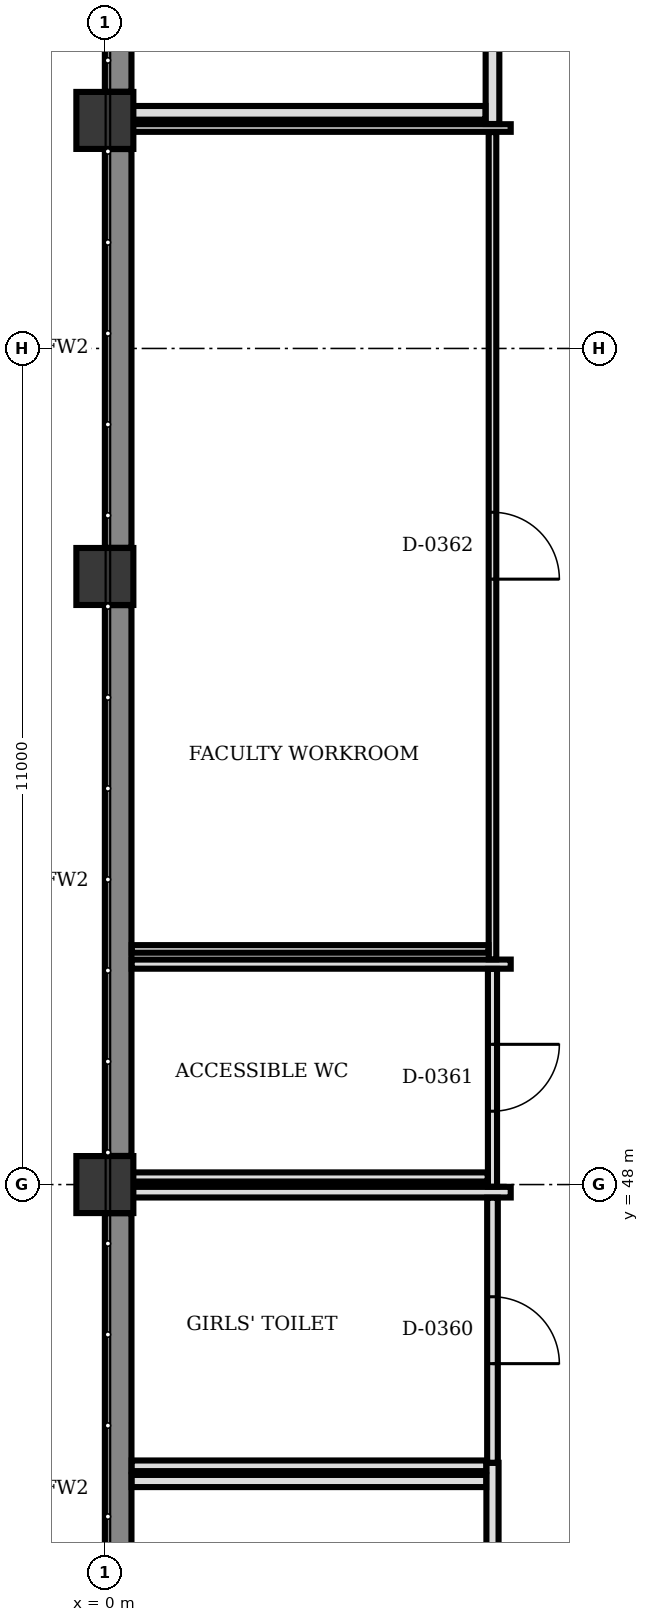
"""IFC4 building model, lengths in metres.
Left out: names, types, materials, properties, quantities, classifications, styles, units other than length and angle.
Written with IfcOpenShell. Run it as: python <this file> out.ifc"""

import sys

from ifc_helpers import new_model, si_unit, direction, frame, frame_2d, origin, origin_2d, place, context, subcontext, project, spatial, rectangle, extrude, element, fill, save


model = new_model("IFC4")
c1 = context("Model", 3, precision=1e-05, world=origin(), true_north=direction((0.0, 1.0)))
c2 = subcontext(c1, "Body", "Model", "MODEL_VIEW")
j1 = project(units=[si_unit("LENGTHUNIT", "METRE"), si_unit("PLANEANGLEUNIT", "RADIAN")], contexts=[c1])
p1 = place(None, origin())
s1 = spatial("IfcSite", under=j1, at=p1, CompositionType="ELEMENT")
p2 = place(p1, origin())
s2 = spatial("IfcBuilding", under=s1, at=p2, CompositionType="ELEMENT")
p3 = place(p2, frame((0.0, 0.0, 4.5)))
s3 = spatial("IfcBuildingStorey", under=s2, at=p3, CompositionType="ELEMENT", Elevation=4.5)
for number, where, z_axis, x_axis in (
    (1, (0.0, 48.0, 0.0), (0.0, 0.0, 1.0), (1.0, 0.0, 0.0)),
    (2, (0.0, 56.0, 0.0), (0.0, 0.0, 1.0), (1.0, 0.0, 0.0)),
    (3, (0.0, 62.0, 0.0), (0.0, 0.0, 1.0), (1.0, 0.0, 0.0)),
):
    element("IfcColumn", number, at=place(p3, frame(where, z_axis=z_axis, x_axis=x_axis)), inside=s3, PredefinedType="COLUMN", context=c2, shape_type="SweptSolid", body=[
        extrude(rectangle(XDim=0.75, YDim=0.75, at=origin_2d()), origin(), (0.0, 0.0, 1.0), 4.0),
    ])
for number, where, z_axis, x_axis in (
    (4, (0.175, 40.377, 0.0), (0.0, 0.0, 1.0), (0.0, 1.0, 0.0)),
    (5, (0.175, 48.377, 0.0), (0.0, 0.0, 1.0), (0.0, 1.0, 0.0)),
):
    element("IfcWall", number, at=place(p3, frame(where, z_axis=z_axis, x_axis=x_axis)), inside=s3, PredefinedType="SHEAR", context=c2, shape_type="SweptSolid", body=[
        extrude(rectangle(XDim=7.246, YDim=0.35, at=frame_2d((3.623, 0.0))), origin(), (0.0, 0.0, 1.0), 3.7),
    ])
for number, where, z_axis, x_axis in (
    (6, (0.175, 56.377, 0.0), (0.0, 0.0, 1.0), (0.0, 1.0, 0.0)),
    (7, (0.175, 62.377, 0.0), (0.0, 0.0, 1.0), (0.0, 1.0, 0.0)),
):
    element("IfcWall", number, at=place(p3, frame(where, z_axis=z_axis, x_axis=x_axis)), inside=s3, PredefinedType="SHEAR", context=c2, shape_type="SweptSolid", body=[
        extrude(rectangle(XDim=5.246, YDim=0.35, at=frame_2d((2.623, 0.0))), origin(), (0.0, 0.0, 1.0), 3.7),
    ])
p4 = place(p3, frame((5.1, 44.34, 0.0), z_axis=(0.0, 0.0, 1.0), x_axis=(0.0, -1.0, 0.0)))
e8 = element("IfcWall", 8, at=p4, inside=s3, PredefinedType="PARTITIONING", context=c2, shape_type="SweptSolid", body=[
    extrude(rectangle(XDim=4.207, YDim=0.16, at=frame_2d((2.104, 0.0))), origin(), (0.0, 0.0, 1.0), 3.7),
])
p5 = place(p4, frame((1.354, 0.0, 0.0)))
e9 = element("IfcOpeningElement", 9, at=p5, cuts=e8, PredefinedType="OPENING", context=c2, shape_type="SweptSolid", body=[
    extrude(rectangle(XDim=1.5, YDim=2.28, at=frame_2d((0.75, 1.14))), frame((0.0, 0.09, 0.0), z_axis=(0.0, -1.0, 0.0), x_axis=(1.0, 0.0, 0.0)), (0.0, 0.0, 1.0), 0.18),
])
p6 = place(p3, frame((0.353, 44.1, 0.0), z_axis=(0.0, 0.0, 1.0), x_axis=(1.0, 0.0, 0.0)))
e10 = element("IfcWall", 10, at=p6, inside=s3, PredefinedType="PARTITIONING", context=c2, shape_type="SweptSolid", body=[
    extrude(rectangle(XDim=4.664, YDim=0.16, at=frame_2d((2.332, 0.0))), origin(), (0.0, 0.0, 1.0), 3.7),
])
p7 = place(p3, frame((0.367, 47.9, 0.0), z_axis=(0.0, 0.0, 1.0), x_axis=(1.0, 0.0, 0.0)))
e11 = element("IfcWall", 11, at=p7, inside=s3, PredefinedType="PARTITIONING", context=c2, shape_type="SweptSolid", body=[
    extrude(rectangle(XDim=4.973, YDim=0.14, at=frame_2d((2.487, 0.0))), origin(), (0.0, 0.0, 1.0), 2.982),
])
p8 = place(p3, frame((5.1, 47.827, 0.0), z_axis=(0.0, 0.0, 1.0), x_axis=(0.0, -1.0, 0.0)))
e12 = element("IfcWall", 12, at=p8, inside=s3, PredefinedType="PARTITIONING", context=c2, shape_type="SweptSolid", body=[
    extrude(rectangle(XDim=3.487, YDim=0.14, at=frame_2d((1.743, 0.0))), origin(), (0.0, 0.0, 1.0), 2.982),
])
p9 = place(p8, frame((1.303, 0.0, 0.0)))
e13 = element("IfcOpeningElement", 13, at=p9, cuts=e12, PredefinedType="OPENING", context=c2, shape_type="SweptSolid", body=[
    extrude(rectangle(XDim=0.88, YDim=2.1, at=frame_2d((0.44, 1.05))), frame((0.0, 0.08, 0.0), z_axis=(0.0, -1.0, 0.0), x_axis=(1.0, 0.0, 0.0)), (0.0, 0.0, 1.0), 0.16),
])
p10 = place(p3, frame((5.017, 44.3, 0.0), z_axis=(0.0, 0.0, 1.0), x_axis=(-1.0, 0.0, 0.0)))
e14 = element("IfcWall", 14, at=p10, inside=s3, PredefinedType="PARTITIONING", context=c2, shape_type="SweptSolid", body=[
    extrude(rectangle(XDim=4.664, YDim=0.14, at=frame_2d((2.332, 0.0))), origin(), (0.0, 0.0, 1.0), 3.7),
])
p11 = place(p3, frame((0.353, 50.9, 0.0), z_axis=(0.0, 0.0, 1.0), x_axis=(1.0, 0.0, 0.0)))
e15 = element("IfcWall", 15, at=p11, inside=s3, PredefinedType="PARTITIONING", context=c2, shape_type="SweptSolid", body=[
    extrude(rectangle(XDim=4.987, YDim=0.12, at=frame_2d((2.494, 0.0))), origin(), (0.0, 0.0, 1.0), 3.7),
])
p12 = place(p3, frame((5.1, 50.837, 0.0), z_axis=(0.0, 0.0, 1.0), x_axis=(0.0, -1.0, 0.0)))
e16 = element("IfcWall", 16, at=p12, inside=s3, PredefinedType="PARTITIONING", context=c2, shape_type="SweptSolid", body=[
    extrude(rectangle(XDim=2.864, YDim=0.12, at=frame_2d((1.432, 0.0))), origin(), (0.0, 0.0, 1.0), 2.982),
])
p13 = place(p12, frame((0.992, 0.0, 0.0)))
e17 = element("IfcOpeningElement", 17, at=p13, cuts=e16, PredefinedType="OPENING", context=c2, shape_type="SweptSolid", body=[
    extrude(rectangle(XDim=0.88, YDim=2.1, at=frame_2d((0.44, 1.05))), frame((0.0, 0.07, 0.0), z_axis=(0.0, -1.0, 0.0), x_axis=(1.0, 0.0, 0.0)), (0.0, 0.0, 1.0), 0.14),
])
p14 = place(p3, frame((5.037, 48.1, 0.0), z_axis=(0.0, 0.0, 1.0), x_axis=(-1.0, 0.0, 0.0)))
e18 = element("IfcWall", 18, at=p14, inside=s3, PredefinedType="PARTITIONING", context=c2, shape_type="SweptSolid", body=[
    extrude(rectangle(XDim=4.67, YDim=0.12, at=frame_2d((2.335, 0.0))), origin(), (0.0, 0.0, 1.0), 2.982),
])
p15 = place(p3, frame((0.367, 61.9, 0.0), z_axis=(0.0, 0.0, 1.0), x_axis=(1.0, 0.0, 0.0)))
e19 = element("IfcWall", 19, at=p15, inside=s3, PredefinedType="PARTITIONING", context=c2, shape_type="SweptSolid", body=[
    extrude(rectangle(XDim=4.973, YDim=0.1, at=frame_2d((2.487, 0.0))), origin(), (0.0, 0.0, 1.0), 2.982),
])
p16 = place(p3, frame((5.1, 61.847, 0.0), z_axis=(0.0, 0.0, 1.0), x_axis=(0.0, -1.0, 0.0)))
e20 = element("IfcWall", 20, at=p16, inside=s3, PredefinedType="PARTITIONING", context=c2, shape_type="SweptSolid", body=[
    extrude(rectangle(XDim=10.884, YDim=0.1, at=frame_2d((5.442, 0.0))), origin(), (0.0, 0.0, 1.0), 2.982),
])
p17 = place(p16, frame((5.002, 0.0, 0.0)))
e21 = element("IfcOpeningElement", 21, at=p17, cuts=e20, PredefinedType="OPENING", context=c2, shape_type="SweptSolid", body=[
    extrude(rectangle(XDim=0.88, YDim=2.1, at=frame_2d((0.44, 1.05))), frame((0.0, 0.06, 0.0), z_axis=(0.0, -1.0, 0.0), x_axis=(1.0, 0.0, 0.0)), (0.0, 0.0, 1.0), 0.12),
])
p18 = place(p3, frame((5.047, 51.1, 0.0), z_axis=(0.0, 0.0, 1.0), x_axis=(-1.0, 0.0, 0.0)))
e22 = element("IfcWall", 22, at=p18, inside=s3, PredefinedType="PARTITIONING", context=c2, shape_type="SweptSolid", body=[
    extrude(rectangle(XDim=4.694, YDim=0.1, at=frame_2d((2.347, 0.0))), origin(), (0.0, 0.0, 1.0), 3.7),
])
p19 = place(p3, frame((5.1, 75.867, 0.0), z_axis=(0.0, 0.0, 1.0), x_axis=(0.0, -1.0, 0.0)))
e23 = element("IfcWall", 23, at=p19, inside=s3, PredefinedType="PARTITIONING", context=c2, shape_type="SweptSolid", body=[
    extrude(rectangle(XDim=13.914, YDim=0.18, at=frame_2d((6.957, 0.0))), origin(), (0.0, 0.0, 1.0), 2.982),
])
p20 = place(p19, frame((6.477, 0.0, 0.0)))
e24 = element("IfcOpeningElement", 24, at=p20, cuts=e23, PredefinedType="OPENING", context=c2, shape_type="SweptSolid", body=[
    extrude(rectangle(XDim=0.96, YDim=2.1, at=frame_2d((0.48, 1.05))), frame((0.0, 0.1, 0.0), z_axis=(0.0, -1.0, 0.0), x_axis=(1.0, 0.0, 0.0)), (0.0, 0.0, 1.0), 0.2),
])
p21 = place(p3, frame((5.007, 62.1, 0.0), z_axis=(0.0, 0.0, 1.0), x_axis=(-1.0, 0.0, 0.0)))
e25 = element("IfcWall", 25, at=p21, inside=s3, PredefinedType="PARTITIONING", context=c2, shape_type="SweptSolid", body=[
    extrude(rectangle(XDim=4.64, YDim=0.18, at=frame_2d((2.32, 0.0))), origin(), (0.0, 0.0, 1.0), 2.982),
])
p22 = place(p9, origin())
e26 = element("IfcDoor", 26, at=p22, inside=s3, OperationType="SINGLE_SWING_RIGHT", PredefinedType="DOOR", context=c2, shape_type="SweptSolid", body=[
    extrude(rectangle(XDim=0.88, YDim=2.1, at=frame_2d((0.44, 1.05))), frame((0.0, 0.025, 0.0), z_axis=(0.0, -1.0, 0.0), x_axis=(1.0, 0.0, 0.0)), (0.0, 0.0, 1.0), 0.05),
])
fill(e13, e26)
p23 = place(p13, origin())
e27 = element("IfcDoor", 27, at=p23, inside=s3, OperationType="SINGLE_SWING_LEFT", PredefinedType="DOOR", context=c2, shape_type="SweptSolid", body=[
    extrude(rectangle(XDim=0.88, YDim=2.1, at=frame_2d((0.44, 1.05))), frame((0.0, 0.025, 0.0), z_axis=(0.0, -1.0, 0.0), x_axis=(1.0, 0.0, 0.0)), (0.0, 0.0, 1.0), 0.05),
])
fill(e17, e27)
p24 = place(p17, origin())
e28 = element("IfcDoor", 28, at=p24, inside=s3, OperationType="SINGLE_SWING_RIGHT", PredefinedType="DOOR", context=c2, shape_type="SweptSolid", body=[
    extrude(rectangle(XDim=0.88, YDim=2.1, at=frame_2d((0.44, 1.05))), frame((0.0, 0.025, 0.0), z_axis=(0.0, -1.0, 0.0), x_axis=(1.0, 0.0, 0.0)), (0.0, 0.0, 1.0), 0.05),
])
fill(e21, e28)
save(model, sys.argv[1])
